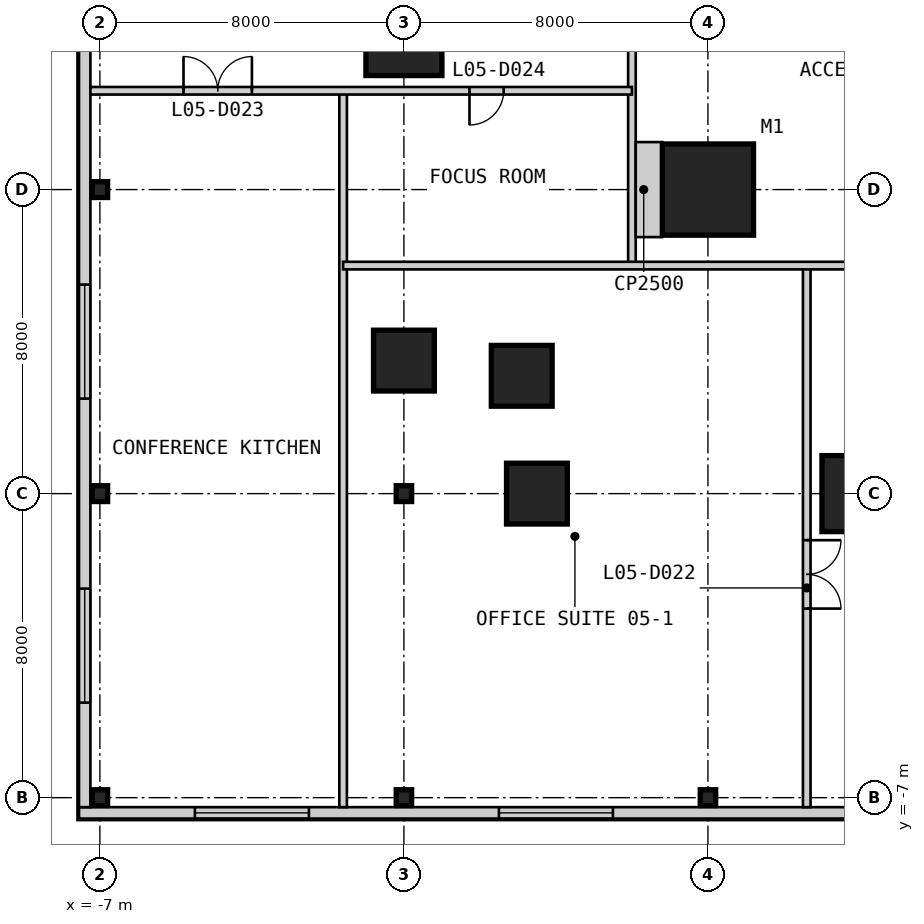
"""IFC4 building model, lengths in metres.
Left out: names, types, materials, properties, quantities, classifications, styles, units other than length and angle.
Written with IfcOpenShell. Run it as: python <this file> out.ifc"""

import sys

from ifc_helpers import new_model, si_unit, direction, frame, frame_2d, origin, origin_2d, place, context, subcontext, project, spatial, rectangle, i_section, extrude, element, fill, save


model = new_model("IFC4")
c1 = context("Model", 3, precision=1e-05, world=origin(), true_north=direction((0.0, 1.0)))
c2 = subcontext(c1, "Body", "Model", "MODEL_VIEW")
j1 = project(units=[si_unit("LENGTHUNIT", "METRE"), si_unit("PLANEANGLEUNIT", "RADIAN")], contexts=[c1])
p1 = place(None, origin())
s1 = spatial("IfcSite", under=j1, at=p1, CompositionType="ELEMENT")
p2 = place(p1, origin())
s2 = spatial("IfcBuilding", under=s1, at=p2, CompositionType="ELEMENT")
p3 = place(p2, frame((0.0, 0.0, 26.2)))
s3 = spatial("IfcBuildingStorey", under=s2, at=p3, CompositionType="ELEMENT", Elevation=26.2)
p4 = place(p3, frame((9.0, 9.0, 0.0), z_axis=(0.0, 0.0, 1.0), x_axis=(1.0, 0.0, 0.0)))
e1 = element("IfcColumn", 1, at=p4, inside=s3, PredefinedType="COLUMN", context=c2, shape_type="SweptSolid", body=[
    extrude(rectangle(XDim=2.4, YDim=2.4, at=origin_2d()), origin(), (0.0, 0.0, 1.0), 4.8),
])
p5 = place(p3, frame((4.5, 1.0, 0.0), z_axis=(0.0, 0.0, 1.0), x_axis=(1.0, 0.0, 0.0)))
e2 = element("IfcColumn", 2, at=p5, inside=s3, PredefinedType="COLUMN", context=c2, shape_type="SweptSolid", body=[
    extrude(rectangle(XDim=1.6, YDim=1.6, at=origin_2d()), origin(), (0.0, 0.0, 1.0), 4.8),
])
for number, where, z_axis, x_axis in (
    (3, (13.0, 1.0, 0.0), (0.0, 0.0, 1.0), (1.0, 0.0, 0.0)),
    (4, (1.0, 13.0, 0.0), (0.0, 0.0, 1.0), (1.0, 0.0, 0.0)),
):
    element("IfcColumn", number, at=place(p3, frame(where, z_axis=z_axis, x_axis=x_axis)), inside=s3, PredefinedType="COLUMN", context=c2, shape_type="SweptSolid", body=[
        extrude(rectangle(XDim=2.0, YDim=2.0, at=origin_2d()), origin(), (0.0, 0.0, 1.0), 4.8),
    ])
for number, where, z_axis, x_axis in (
    (5, (1.0, 4.5, 0.0), (0.0, 0.0, 1.0), (1.0, 0.0, 0.0)),
    (6, (4.1, 4.1, 0.0), (0.0, 0.0, 1.0), (1.0, 0.0, 0.0)),
):
    element("IfcColumn", number, at=place(p3, frame(where, z_axis=z_axis, x_axis=x_axis)), inside=s3, PredefinedType="COLUMN", context=c2, shape_type="SweptSolid", body=[
        extrude(rectangle(XDim=1.6, YDim=1.6, at=origin_2d()), origin(), (0.0, 0.0, 1.0), 4.8),
    ])
for number, where, z_axis, x_axis in (
    (7, (-7.0, -7.0, 0.0), (0.0, 0.0, 1.0), (1.0, 0.0, 0.0)),
    (8, (-7.0, 1.0, 0.0), (0.0, 0.0, 1.0), (1.0, 0.0, 0.0)),
    (9, (-7.0, 9.0, 0.0), (0.0, 0.0, 1.0), (1.0, 0.0, 0.0)),
    (10, (1.0, -7.0, 0.0), (0.0, 0.0, 1.0), (1.0, 0.0, 0.0)),
    (11, (1.0, 1.0, 0.0), (0.0, 0.0, 1.0), (1.0, 0.0, 0.0)),
    (12, (9.0, -7.0, 0.0), (0.0, 0.0, 1.0), (1.0, 0.0, 0.0)),
):
    element("IfcColumn", number, at=place(p3, frame(where, z_axis=z_axis, x_axis=x_axis)), inside=s3, PredefinedType="COLUMN", context=c2, shape_type="SweptSolid", body=[
        extrude(i_section(OverallWidth=0.406, OverallDepth=0.417, WebThickness=0.03, FlangeThickness=0.048, at=origin_2d()), origin(), (0.0, 0.0, 1.0), 4.8),
    ])
p6 = place(p3, frame((-7.55, -7.4, 0.0), z_axis=(0.0, 0.0, 1.0), x_axis=(1.0, 0.0, 0.0)))
e13 = element("IfcWall", 13, at=p6, inside=s3, PredefinedType="SOLIDWALL", context=c2, shape_type="SweptSolid", body=[
    extrude(rectangle(XDim=65.1, YDim=0.3, at=frame_2d((32.55, 0.0))), origin(), (0.0, 0.0, 1.0), 4.5),
])
p7 = place(p6, frame((3.05, 0.0, 0.9)))
e14 = element("IfcOpeningElement", 14, at=p7, cuts=e13, PredefinedType="OPENING", context=c2, shape_type="SweptSolid", body=[
    extrude(rectangle(XDim=3.0, YDim=2.4, at=frame_2d((1.5, 1.2))), frame((0.0, 0.16, 0.0), z_axis=(0.0, -1.0, 0.0), x_axis=(1.0, 0.0, 0.0)), (0.0, 0.0, 1.0), 0.32),
])
p8 = place(p6, frame((11.05, 0.0, 0.9)))
e15 = element("IfcOpeningElement", 15, at=p8, cuts=e13, PredefinedType="OPENING", context=c2, shape_type="SweptSolid", body=[
    extrude(rectangle(XDim=3.0, YDim=2.4, at=frame_2d((1.5, 1.2))), frame((0.0, 0.16, 0.0), z_axis=(0.0, -1.0, 0.0), x_axis=(1.0, 0.0, 0.0)), (0.0, 0.0, 1.0), 0.32),
])
p9 = place(p6, frame((25.05, 0.0, 0.9)))
e16 = element("IfcOpeningElement", 16, at=p9, cuts=e13, PredefinedType="OPENING", context=c2, shape_type="SweptSolid", body=[
    extrude(rectangle(XDim=3.0, YDim=2.4, at=frame_2d((1.5, 1.2))), frame((0.0, 0.16, 0.0), z_axis=(0.0, -1.0, 0.0), x_axis=(1.0, 0.0, 0.0)), (0.0, 0.0, 1.0), 0.32),
])
p10 = place(p6, frame((37.05, 0.0, 0.9)))
e17 = element("IfcOpeningElement", 17, at=p10, cuts=e13, PredefinedType="OPENING", context=c2, shape_type="SweptSolid", body=[
    extrude(rectangle(XDim=3.0, YDim=2.4, at=frame_2d((1.5, 1.2))), frame((0.0, 0.16, 0.0), z_axis=(0.0, -1.0, 0.0), x_axis=(1.0, 0.0, 0.0)), (0.0, 0.0, 1.0), 0.32),
])
p11 = place(p6, frame((45.55, 0.0, 0.9)))
e18 = element("IfcOpeningElement", 18, at=p11, cuts=e13, PredefinedType="OPENING", context=c2, shape_type="SweptSolid", body=[
    extrude(rectangle(XDim=3.0, YDim=2.4, at=frame_2d((1.5, 1.2))), frame((0.0, 0.16, 0.0), z_axis=(0.0, -1.0, 0.0), x_axis=(1.0, 0.0, 0.0)), (0.0, 0.0, 1.0), 0.32),
])
p12 = place(p6, frame((51.55, 0.0, 0.9)))
e19 = element("IfcOpeningElement", 19, at=p12, cuts=e13, PredefinedType="OPENING", context=c2, shape_type="SweptSolid", body=[
    extrude(rectangle(XDim=3.0, YDim=2.4, at=frame_2d((1.5, 1.2))), frame((0.0, 0.16, 0.0), z_axis=(0.0, -1.0, 0.0), x_axis=(1.0, 0.0, 0.0)), (0.0, 0.0, 1.0), 0.32),
])
p13 = place(p6, frame((59.05, 0.0, 0.9)))
e20 = element("IfcOpeningElement", 20, at=p13, cuts=e13, PredefinedType="OPENING", context=c2, shape_type="SweptSolid", body=[
    extrude(rectangle(XDim=3.0, YDim=2.4, at=frame_2d((1.5, 1.2))), frame((0.0, 0.16, 0.0), z_axis=(0.0, -1.0, 0.0), x_axis=(1.0, 0.0, 0.0)), (0.0, 0.0, 1.0), 0.32),
])
p14 = place(p3, frame((-7.4, 65.25, 0.0), z_axis=(0.0, 0.0, 1.0), x_axis=(0.0, -1.0, 0.0)))
e21 = element("IfcWall", 21, at=p14, inside=s3, PredefinedType="SOLIDWALL", context=c2, shape_type="SweptSolid", body=[
    extrude(rectangle(XDim=72.5, YDim=0.3, at=frame_2d((36.25, 0.0))), origin(), (0.0, 0.0, 1.0), 4.5),
])
p15 = place(p14, frame((66.75, 0.0, 0.9)))
e22 = element("IfcOpeningElement", 22, at=p15, cuts=e21, PredefinedType="OPENING", context=c2, shape_type="SweptSolid", body=[
    extrude(rectangle(XDim=3.0, YDim=2.4, at=frame_2d((1.5, 1.2))), frame((0.0, 0.16, 0.0), z_axis=(0.0, -1.0, 0.0), x_axis=(1.0, 0.0, 0.0)), (0.0, 0.0, 1.0), 0.32),
])
p16 = place(p14, frame((58.75, 0.0, 0.9)))
e23 = element("IfcOpeningElement", 23, at=p16, cuts=e21, PredefinedType="OPENING", context=c2, shape_type="SweptSolid", body=[
    extrude(rectangle(XDim=3.0, YDim=2.4, at=frame_2d((1.5, 1.2))), frame((0.0, 0.16, 0.0), z_axis=(0.0, -1.0, 0.0), x_axis=(1.0, 0.0, 0.0)), (0.0, 0.0, 1.0), 0.32),
])
p17 = place(p14, frame((44.75, 0.0, 0.9)))
e24 = element("IfcOpeningElement", 24, at=p17, cuts=e21, PredefinedType="OPENING", context=c2, shape_type="SweptSolid", body=[
    extrude(rectangle(XDim=3.0, YDim=2.4, at=frame_2d((1.5, 1.2))), frame((0.0, 0.16, 0.0), z_axis=(0.0, -1.0, 0.0), x_axis=(1.0, 0.0, 0.0)), (0.0, 0.0, 1.0), 0.32),
])
p18 = place(p14, frame((32.75, 0.0, 0.9)))
e25 = element("IfcOpeningElement", 25, at=p18, cuts=e21, PredefinedType="OPENING", context=c2, shape_type="SweptSolid", body=[
    extrude(rectangle(XDim=3.0, YDim=2.4, at=frame_2d((1.5, 1.2))), frame((0.0, 0.16, 0.0), z_axis=(0.0, -1.0, 0.0), x_axis=(1.0, 0.0, 0.0)), (0.0, 0.0, 1.0), 0.32),
])
p19 = place(p14, frame((24.25, 0.0, 0.9)))
e26 = element("IfcOpeningElement", 26, at=p19, cuts=e21, PredefinedType="OPENING", context=c2, shape_type="SweptSolid", body=[
    extrude(rectangle(XDim=3.0, YDim=2.4, at=frame_2d((1.5, 1.2))), frame((0.0, 0.16, 0.0), z_axis=(0.0, -1.0, 0.0), x_axis=(1.0, 0.0, 0.0)), (0.0, 0.0, 1.0), 0.32),
])
p20 = place(p14, frame((18.25, 0.0, 0.9)))
e27 = element("IfcOpeningElement", 27, at=p20, cuts=e21, PredefinedType="OPENING", context=c2, shape_type="SweptSolid", body=[
    extrude(rectangle(XDim=3.0, YDim=2.4, at=frame_2d((1.5, 1.2))), frame((0.0, 0.16, 0.0), z_axis=(0.0, -1.0, 0.0), x_axis=(1.0, 0.0, 0.0)), (0.0, 0.0, 1.0), 0.32),
])
p21 = place(p14, frame((10.75, 0.0, 0.9)))
e28 = element("IfcOpeningElement", 28, at=p21, cuts=e21, PredefinedType="OPENING", context=c2, shape_type="SweptSolid", body=[
    extrude(rectangle(XDim=3.0, YDim=2.4, at=frame_2d((1.5, 1.2))), frame((0.0, 0.16, 0.0), z_axis=(0.0, -1.0, 0.0), x_axis=(1.0, 0.0, 0.0)), (0.0, 0.0, 1.0), 0.32),
])
p22 = place(p14, frame((2.75, 0.0, 0.9)))
e29 = element("IfcOpeningElement", 29, at=p22, cuts=e21, PredefinedType="OPENING", context=c2, shape_type="SweptSolid", body=[
    extrude(rectangle(XDim=3.0, YDim=2.4, at=frame_2d((1.5, 1.2))), frame((0.0, 0.16, 0.0), z_axis=(0.0, -1.0, 0.0), x_axis=(1.0, 0.0, 0.0)), (0.0, 0.0, 1.0), 0.32),
])
p23 = place(p3, frame((-0.6, -7.25, 0.0), z_axis=(0.0, 0.0, 1.0), x_axis=(0.0, 1.0, 0.0)))
e30 = element("IfcWall", 30, at=p23, inside=s3, PredefinedType="PARTITIONING", context=c2, shape_type="SweptSolid", body=[
    extrude(rectangle(XDim=18.85, YDim=0.2, at=frame_2d((9.425, 0.0))), origin(), (0.0, 0.0, 1.0), 4.5),
])
p24 = place(p3, frame((7.0, 7.0, 0.0), z_axis=(0.0, 0.0, 1.0), x_axis=(0.0, 1.0, 0.0)))
e31 = element("IfcWall", 31, at=p24, inside=s3, PredefinedType="PARTITIONING", context=c2, shape_type="SweptSolid", body=[
    extrude(rectangle(XDim=6.0, YDim=0.2, at=frame_2d((3.0, 0.0))), origin(), (0.0, 0.0, 1.0), 4.5),
])
p25 = place(p3, frame((11.6, -7.25, 0.0), z_axis=(0.0, 0.0, 1.0), x_axis=(0.0, 1.0, 0.0)))
e32 = element("IfcWall", 32, at=p25, inside=s3, PredefinedType="PARTITIONING", context=c2, shape_type="SweptSolid", body=[
    extrude(rectangle(XDim=14.25, YDim=0.2, at=frame_2d((7.125, 0.0))), origin(), (0.0, 0.0, 1.0), 4.5),
])
p26 = place(p25, frame((5.225, 0.0, 0.0)))
e33 = element("IfcOpeningElement", 33, at=p26, cuts=e32, PredefinedType="OPENING", context=c2, shape_type="SweptSolid", body=[
    extrude(rectangle(XDim=1.8, YDim=2.4, at=frame_2d((0.9, 1.2))), frame((0.0, 0.11, 0.0), z_axis=(0.0, -1.0, 0.0), x_axis=(1.0, 0.0, 0.0)), (0.0, 0.0, 1.0), 0.22),
])
p27 = place(p3, frame((-0.6, 7.0, 0.0), z_axis=(0.0, 0.0, 1.0), x_axis=(1.0, 0.0, 0.0)))
e34 = element("IfcWall", 34, at=p27, inside=s3, PredefinedType="PARTITIONING", context=c2, shape_type="SweptSolid", body=[
    extrude(rectangle(XDim=34.6, YDim=0.2, at=frame_2d((17.3, 0.0))), origin(), (0.0, 0.0, 1.0), 4.5),
])
p28 = place(p27, frame((14.15, 0.0, 0.0)))
e35 = element("IfcOpeningElement", 35, at=p28, cuts=e34, PredefinedType="OPENING", context=c2, shape_type="SweptSolid", body=[
    extrude(rectangle(XDim=0.9, YDim=2.2, at=frame_2d((0.45, 1.1))), frame((0.0, 0.11, 0.0), z_axis=(0.0, -1.0, 0.0), x_axis=(1.0, 0.0, 0.0)), (0.0, 0.0, 1.0), 0.22),
])
p29 = place(p3, frame((-7.25, 11.6, 0.0), z_axis=(0.0, 0.0, 1.0), x_axis=(1.0, 0.0, 0.0)))
e36 = element("IfcWall", 36, at=p29, inside=s3, PredefinedType="PARTITIONING", context=c2, shape_type="SweptSolid", body=[
    extrude(rectangle(XDim=14.25, YDim=0.2, at=frame_2d((7.125, 0.0))), origin(), (0.0, 0.0, 1.0), 4.5),
])
p30 = place(p29, frame((2.45, 0.0, 0.0)))
e37 = element("IfcOpeningElement", 37, at=p30, cuts=e36, PredefinedType="OPENING", context=c2, shape_type="SweptSolid", body=[
    extrude(rectangle(XDim=1.8, YDim=2.4, at=frame_2d((0.9, 1.2))), frame((0.0, 0.11, 0.0), z_axis=(0.0, -1.0, 0.0), x_axis=(1.0, 0.0, 0.0)), (0.0, 0.0, 1.0), 0.22),
])
p31 = place(p29, frame((9.975, 0.0, 0.0)))
e38 = element("IfcOpeningElement", 38, at=p31, cuts=e36, PredefinedType="OPENING", context=c2, shape_type="SweptSolid", body=[
    extrude(rectangle(XDim=0.9, YDim=2.2, at=frame_2d((0.45, 1.1))), frame((0.0, 0.11, 0.0), z_axis=(0.0, -1.0, 0.0), x_axis=(1.0, 0.0, 0.0)), (0.0, 0.0, 1.0), 0.22),
])
p32 = place(p3, frame((7.1, 9.0, 0.0), z_axis=(0.0, 0.0, 1.0), x_axis=(1.0, 0.0, 0.0)))
e39 = element("IfcWall", 39, at=p32, inside=s3, PredefinedType="PARTITIONING", context=c2, shape_type="SweptSolid", body=[
    extrude(rectangle(XDim=0.7, YDim=2.5, at=frame_2d((0.35, 0.0))), origin(), (0.0, 0.0, 1.0), 4.5),
])
p33 = place(p7, origin())
e40 = element("IfcWindow", 40, at=p33, inside=s3, PartitioningType="SINGLE_PANEL", PredefinedType="WINDOW", context=c2, shape_type="SweptSolid", body=[
    extrude(rectangle(XDim=3.0, YDim=2.4, at=frame_2d((1.5, 1.2))), frame((0.0, 0.03, 0.0), z_axis=(0.0, -1.0, 0.0), x_axis=(1.0, 0.0, 0.0)), (0.0, 0.0, 1.0), 0.06),
])
fill(e14, e40)
p34 = place(p8, origin())
e41 = element("IfcWindow", 41, at=p34, inside=s3, PartitioningType="SINGLE_PANEL", PredefinedType="WINDOW", context=c2, shape_type="SweptSolid", body=[
    extrude(rectangle(XDim=3.0, YDim=2.4, at=frame_2d((1.5, 1.2))), frame((0.0, 0.03, 0.0), z_axis=(0.0, -1.0, 0.0), x_axis=(1.0, 0.0, 0.0)), (0.0, 0.0, 1.0), 0.06),
])
fill(e15, e41)
p35 = place(p15, origin())
e42 = element("IfcWindow", 42, at=p35, inside=s3, PartitioningType="SINGLE_PANEL", PredefinedType="WINDOW", context=c2, shape_type="SweptSolid", body=[
    extrude(rectangle(XDim=3.0, YDim=2.4, at=frame_2d((1.5, 1.2))), frame((0.0, 0.03, 0.0), z_axis=(0.0, -1.0, 0.0), x_axis=(1.0, 0.0, 0.0)), (0.0, 0.0, 1.0), 0.06),
])
fill(e22, e42)
p36 = place(p16, origin())
e43 = element("IfcWindow", 43, at=p36, inside=s3, PartitioningType="SINGLE_PANEL", PredefinedType="WINDOW", context=c2, shape_type="SweptSolid", body=[
    extrude(rectangle(XDim=3.0, YDim=2.4, at=frame_2d((1.5, 1.2))), frame((0.0, 0.03, 0.0), z_axis=(0.0, -1.0, 0.0), x_axis=(1.0, 0.0, 0.0)), (0.0, 0.0, 1.0), 0.06),
])
fill(e23, e43)
p37 = place(p26, frame((1.8, 0.0, 0.0), z_axis=(0.0, 0.0, 1.0), x_axis=(-1.0, 0.0, 0.0)))
e44 = element("IfcDoor", 44, at=p37, inside=s3, OperationType="DOUBLE_DOOR_SINGLE_SWING", PredefinedType="DOOR", context=c2, shape_type="SweptSolid", body=[
    extrude(rectangle(XDim=1.8, YDim=2.4, at=frame_2d((0.9, 1.2))), frame((0.0, 0.025, 0.0), z_axis=(0.0, -1.0, 0.0), x_axis=(1.0, 0.0, 0.0)), (0.0, 0.0, 1.0), 0.05),
])
fill(e33, e44)
p38 = place(p30, origin())
e45 = element("IfcDoor", 45, at=p38, inside=s3, OperationType="DOUBLE_DOOR_SINGLE_SWING", PredefinedType="DOOR", context=c2, shape_type="SweptSolid", body=[
    extrude(rectangle(XDim=1.8, YDim=2.4, at=frame_2d((0.9, 1.2))), frame((0.0, 0.025, 0.0), z_axis=(0.0, -1.0, 0.0), x_axis=(1.0, 0.0, 0.0)), (0.0, 0.0, 1.0), 0.05),
])
fill(e37, e45)
p39 = place(p31, frame((0.9, 0.0, 0.0), z_axis=(0.0, 0.0, 1.0), x_axis=(-1.0, 0.0, 0.0)))
e46 = element("IfcDoor", 46, at=p39, inside=s3, OperationType="SINGLE_SWING_RIGHT", PredefinedType="DOOR", context=c2, shape_type="SweptSolid", body=[
    extrude(rectangle(XDim=0.9, YDim=2.2, at=frame_2d((0.45, 1.1))), frame((0.0, 0.025, 0.0), z_axis=(0.0, -1.0, 0.0), x_axis=(1.0, 0.0, 0.0)), (0.0, 0.0, 1.0), 0.05),
])
fill(e38, e46)
save(model, sys.argv[1])
